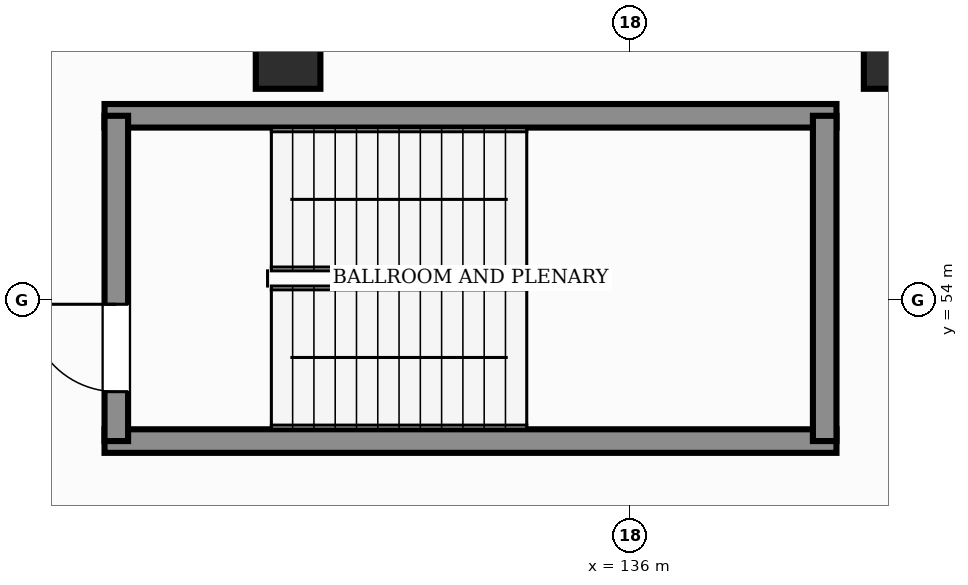
"""IFC4 building model, lengths in metres.
Left out: names, types, materials, properties, quantities, classifications, styles, units other than length and angle.
Written with IfcOpenShell. Run it as: python <this file> out.ifc"""

import sys

from ifc_helpers import new_model, si_unit, direction, frame, frame_2d, origin, origin_2d, place, context, subcontext, project, spatial, rectangle, extrude, element, fill, save


model = new_model("IFC4")
c1 = context("Model", 3, precision=1e-05, world=origin(), true_north=direction((0.0, 1.0)))
c2 = subcontext(c1, "Body", "Model", "MODEL_VIEW")
j1 = project(units=[si_unit("LENGTHUNIT", "METRE"), si_unit("PLANEANGLEUNIT", "RADIAN")], contexts=[c1])
p1 = place(None, origin())
s1 = spatial("IfcSite", under=j1, at=p1, CompositionType="ELEMENT")
p2 = place(p1, origin())
s2 = spatial("IfcBuilding", under=s1, at=p2, CompositionType="ELEMENT")
p3 = place(p2, frame((0.0, 0.0, -4.8)))
s3 = spatial("IfcBuildingStorey", under=s2, at=p3, CompositionType="ELEMENT", Elevation=-4.8)
for number, where, z_axis, x_axis in (
    (1, (131.5, 57.2, 0.0), (0.0, 0.0, 1.0), (1.0, 0.0, 0.0)),
    (2, (139.5, 57.2, 0.0), (0.0, 0.0, 1.0), (1.0, 0.0, 0.0)),
):
    element("IfcColumn", number, at=place(p3, frame(where, z_axis=z_axis, x_axis=x_axis)), inside=s3, PredefinedType="COLUMN", context=c2, shape_type="SweptSolid", body=[
        extrude(rectangle(XDim=0.85, YDim=0.85, at=origin_2d()), origin(), (0.0, 0.0, 1.0), 4.8),
    ])
for number, where, z_axis, x_axis in (
    (3, (129.085, 52.14, 0.0), (0.0, 0.0, 1.0), (1.0, 0.0, 0.0)),
    (4, (129.085, 56.42, 0.0), (0.0, 0.0, 1.0), (1.0, 0.0, 0.0)),
):
    element("IfcWall", number, at=place(p3, frame(where, z_axis=z_axis, x_axis=x_axis)), inside=s3, PredefinedType="SHEAR", context=c2, shape_type="SweptSolid", body=[
        extrude(rectangle(XDim=9.63, YDim=0.31, at=frame_2d((4.815, 0.0))), origin(), (0.0, 0.0, 1.0), 4.8),
    ])
p4 = place(p3, frame((129.24, 52.14, 0.0), z_axis=(0.0, 0.0, 1.0), x_axis=(0.0, 1.0, 0.0)))
e5 = element("IfcWall", 5, at=p4, inside=s3, PredefinedType="SHEAR", context=c2, shape_type="SweptSolid", body=[
    extrude(rectangle(XDim=4.28, YDim=0.31, at=frame_2d((2.14, 0.0))), origin(), (0.0, 0.0, 1.0), 4.8),
])
p5 = place(p4, frame((0.65, 0.0, 0.0)))
e6 = element("IfcOpeningElement", 6, at=p5, cuts=e5, PredefinedType="OPENING", context=c2, shape_type="SweptSolid", body=[
    extrude(rectangle(XDim=1.15, YDim=2.2, at=frame_2d((0.575, 1.1))), frame((0.0, 0.165, 0.0), z_axis=(0.0, -1.0, 0.0), x_axis=(1.0, 0.0, 0.0)), (0.0, 0.0, 1.0), 0.33),
])
p6 = place(p3, frame((138.56, 52.14, 0.0), z_axis=(0.0, 0.0, 1.0), x_axis=(0.0, 1.0, 0.0)))
e7 = element("IfcWall", 7, at=p6, inside=s3, PredefinedType="SHEAR", context=c2, shape_type="SweptSolid", body=[
    extrude(rectangle(XDim=4.28, YDim=0.31, at=frame_2d((2.14, 0.0))), origin(), (0.0, 0.0, 1.0), 4.8),
])
p7 = place(p5, origin())
e8 = element("IfcDoor", 8, at=p7, inside=s3, OperationType="SINGLE_SWING_RIGHT", PredefinedType="DOOR", context=c2, shape_type="SweptSolid", body=[
    extrude(rectangle(XDim=1.15, YDim=2.2, at=frame_2d((0.575, 1.1))), frame((0.0, 0.025, 0.0), z_axis=(0.0, -1.0, 0.0), x_axis=(1.0, 0.0, 0.0)), (0.0, 0.0, 1.0), 0.05),
])
fill(e6, e8)
save(model, sys.argv[1])
